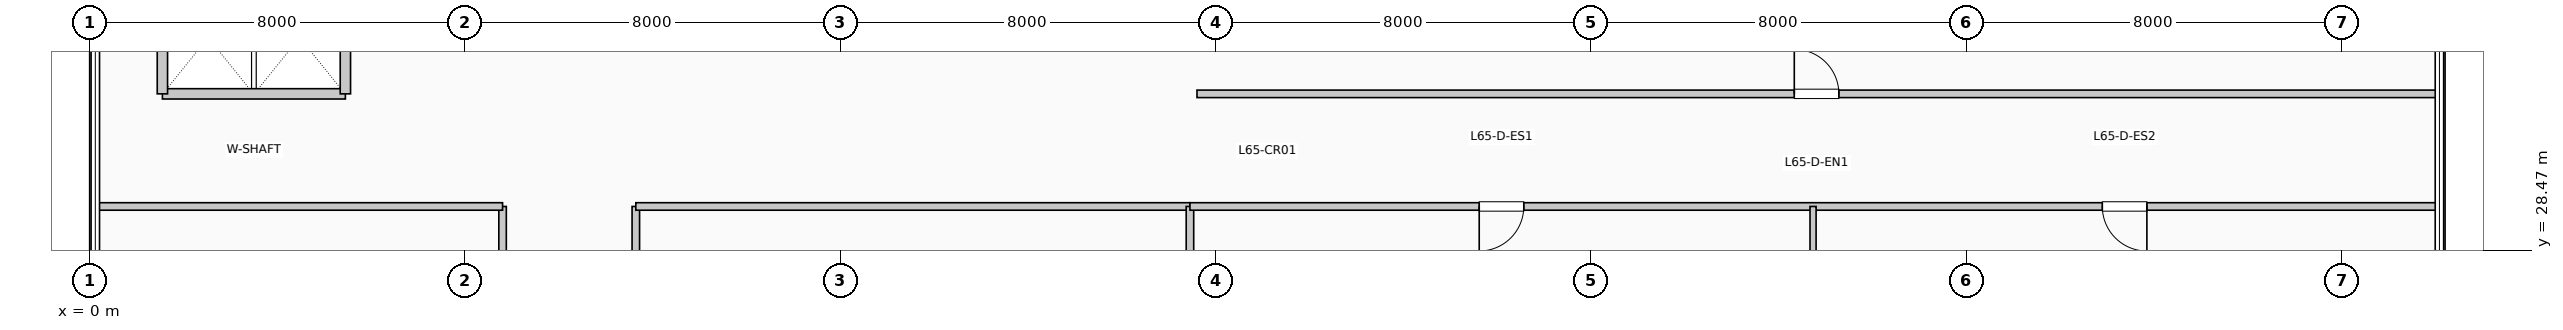
"""IFC4 building model, lengths in metres.
Left out: names, types, materials, properties, quantities, classifications, styles, units other than length and angle.
Written with IfcOpenShell. Run it as: python <this file> out.ifc"""

import sys

from ifc_helpers import new_model, si_unit, direction, frame, frame_2d, origin, place, context, subcontext, project, spatial, rectangle, extrude, element, fill, save


model = new_model("IFC4")
c1 = context("Model", 3, precision=1e-05, world=origin(), true_north=direction((0.0, 1.0)))
c2 = subcontext(c1, "Body", "Model", "MODEL_VIEW")
j1 = project(units=[si_unit("LENGTHUNIT", "METRE"), si_unit("PLANEANGLEUNIT", "RADIAN")], contexts=[c1])
p1 = place(None, origin())
s1 = spatial("IfcSite", under=j1, at=p1, CompositionType="ELEMENT")
p2 = place(p1, origin())
s2 = spatial("IfcBuilding", under=s1, at=p2, CompositionType="ELEMENT")
p3 = place(p2, frame((0.0, 0.0, 268.29)))
s3 = spatial("IfcBuildingStorey", under=s2, at=p3, CompositionType="ELEMENT", Elevation=268.29)
p4 = place(p3, frame((1.55, 31.8, 0.0), z_axis=(0.0, 0.0, 1.0), x_axis=(1.0, 0.0, 0.0)))
e1 = element("IfcWall", 1, at=p4, inside=s3, PredefinedType="PARTITIONING", context=c2, shape_type="SweptSolid", body=[
    extrude(rectangle(XDim=3.9, YDim=0.22, at=frame_2d((1.95, 0.0))), origin(), (0.0, 0.0, 1.0), 3.74),
])
for number, where, z_axis, x_axis in (
    (2, (1.55, 31.8, 0.0), (0.0, 0.0, 1.0), (0.0, 1.0, 0.0)),
    (3, (5.45, 31.8, 0.0), (0.0, 0.0, 1.0), (0.0, 1.0, 0.0)),
):
    element("IfcWall", number, at=place(p3, frame(where, z_axis=z_axis, x_axis=x_axis)), inside=s3, PredefinedType="PARTITIONING", context=c2, shape_type="SweptSolid", body=[
        extrude(rectangle(XDim=2.38, YDim=0.22, at=frame_2d((1.19, 0.0))), origin(), (0.0, 0.0, 1.0), 3.74),
    ])
p5 = place(p3, frame((8.8, 15.0, 0.0), z_axis=(0.0, 0.0, 1.0), x_axis=(0.0, 1.0, 0.0)))
e4 = element("IfcWall", 4, at=p5, inside=s3, PredefinedType="PARTITIONING", context=c2, shape_type="SweptSolid", body=[
    extrude(rectangle(XDim=14.4, YDim=0.16, at=frame_2d((7.2, 0.0))), origin(), (0.0, 0.0, 1.0), 3.74),
])
p6 = place(p5, frame((2.059, 0.0, 0.0), z_axis=(0.0, 0.0, 1.0), x_axis=(-1.0, 0.0, 0.0)))
e5 = element("IfcOpeningElement", 5, at=p6, cuts=e4, PredefinedType="OPENING", context=c2, shape_type="SweptSolid", body=[
    extrude(rectangle(XDim=0.95, YDim=2.15, at=frame_2d((0.475, 1.075))), frame((0.0, 0.09, 0.0), z_axis=(0.0, -1.0, 0.0), x_axis=(1.0, 0.0, 0.0)), (0.0, 0.0, 1.0), 0.18),
])
p7 = place(p5, frame((5.515, 0.0, 0.0), z_axis=(0.0, 0.0, 1.0), x_axis=(-1.0, 0.0, 0.0)))
e6 = element("IfcOpeningElement", 6, at=p7, cuts=e4, PredefinedType="OPENING", context=c2, shape_type="SweptSolid", body=[
    extrude(rectangle(XDim=0.95, YDim=2.15, at=frame_2d((0.475, 1.075))), frame((0.0, 0.09, 0.0), z_axis=(0.0, -1.0, 0.0), x_axis=(1.0, 0.0, 0.0)), (0.0, 0.0, 1.0), 0.18),
])
p8 = place(p5, frame((9.331, 0.0, 0.0), z_axis=(0.0, 0.0, 1.0), x_axis=(-1.0, 0.0, 0.0)))
e7 = element("IfcOpeningElement", 7, at=p8, cuts=e4, PredefinedType="OPENING", context=c2, shape_type="SweptSolid", body=[
    extrude(rectangle(XDim=0.95, YDim=2.15, at=frame_2d((0.475, 1.075))), frame((0.0, 0.09, 0.0), z_axis=(0.0, -1.0, 0.0), x_axis=(1.0, 0.0, 0.0)), (0.0, 0.0, 1.0), 0.18),
])
p9 = place(p5, frame((13.075, 0.0, 0.0), z_axis=(0.0, 0.0, 1.0), x_axis=(-1.0, 0.0, 0.0)))
e8 = element("IfcOpeningElement", 8, at=p9, cuts=e4, PredefinedType="OPENING", context=c2, shape_type="SweptSolid", body=[
    extrude(rectangle(XDim=0.95, YDim=2.15, at=frame_2d((0.475, 1.075))), frame((0.0, 0.09, 0.0), z_axis=(0.0, -1.0, 0.0), x_axis=(1.0, 0.0, 0.0)), (0.0, 0.0, 1.0), 0.18),
])
p10 = place(p3, frame((11.64, 15.0, 0.0), z_axis=(0.0, 0.0, 1.0), x_axis=(0.0, 1.0, 0.0)))
e9 = element("IfcWall", 9, at=p10, inside=s3, PredefinedType="PARTITIONING", context=c2, shape_type="SweptSolid", body=[
    extrude(rectangle(XDim=14.4, YDim=0.16, at=frame_2d((7.2, 0.0))), origin(), (0.0, 0.0, 1.0), 3.125),
])
p11 = place(p10, frame((2.125, 0.0, 0.0)))
e10 = element("IfcOpeningElement", 10, at=p11, cuts=e9, PredefinedType="OPENING", context=c2, shape_type="SweptSolid", body=[
    extrude(rectangle(XDim=0.95, YDim=2.15, at=frame_2d((0.475, 1.075))), frame((0.0, 0.09, 0.0), z_axis=(0.0, -1.0, 0.0), x_axis=(1.0, 0.0, 0.0)), (0.0, 0.0, 1.0), 0.18),
])
p12 = place(p10, frame((10.325, 0.0, 0.0)))
e11 = element("IfcOpeningElement", 11, at=p12, cuts=e9, PredefinedType="OPENING", context=c2, shape_type="SweptSolid", body=[
    extrude(rectangle(XDim=0.95, YDim=2.15, at=frame_2d((0.475, 1.075))), frame((0.0, 0.09, 0.0), z_axis=(0.0, -1.0, 0.0), x_axis=(1.0, 0.0, 0.0)), (0.0, 0.0, 1.0), 0.18),
])
p13 = place(p3, frame((0.19, 29.4, 0.0), z_axis=(0.0, 0.0, 1.0), x_axis=(1.0, 0.0, 0.0)))
e12 = element("IfcWall", 12, at=p13, inside=s3, PredefinedType="PARTITIONING", context=c2, shape_type="SweptSolid", body=[
    extrude(rectangle(XDim=8.61, YDim=0.16, at=frame_2d((4.305, 0.0))), origin(), (0.0, 0.0, 1.0), 3.395),
])
p14 = place(p3, frame((11.64, 29.4, 0.0), z_axis=(0.0, 0.0, 1.0), x_axis=(1.0, 0.0, 0.0)))
e13 = element("IfcWall", 13, at=p14, inside=s3, PredefinedType="PARTITIONING", context=c2, shape_type="SweptSolid", body=[
    extrude(rectangle(XDim=11.81, YDim=0.16, at=frame_2d((5.905, 0.0))), origin(), (0.0, 0.0, 1.0), 3.395),
])
p15 = place(p3, frame((23.45, 5.99, 0.0), z_axis=(0.0, 0.0, 1.0), x_axis=(0.0, 1.0, 0.0)))
e14 = element("IfcWall", 14, at=p15, inside=s3, PredefinedType="PARTITIONING", context=c2, shape_type="SweptSolid", body=[
    extrude(rectangle(XDim=23.41, YDim=0.16, at=frame_2d((11.705, 0.0))), origin(), (0.0, 0.0, 1.0), 3.125),
])
p16 = place(p3, frame((23.45, 29.4, 0.0), z_axis=(0.0, 0.0, 1.0), x_axis=(1.0, 0.0, 0.0)))
e15 = element("IfcWall", 15, at=p16, inside=s3, PredefinedType="PARTITIONING", context=c2, shape_type="SweptSolid", body=[
    extrude(rectangle(XDim=26.56, YDim=0.16, at=frame_2d((13.28, 0.0))), origin(), (0.0, 0.0, 1.0), 3.335),
])
p17 = place(p16, frame((7.115, 0.0, 0.0), z_axis=(0.0, 0.0, 1.0), x_axis=(-1.0, 0.0, 0.0)))
e16 = element("IfcOpeningElement", 16, at=p17, cuts=e15, PredefinedType="OPENING", context=c2, shape_type="SweptSolid", body=[
    extrude(rectangle(XDim=0.95, YDim=2.15, at=frame_2d((0.475, 1.075))), frame((0.0, 0.09, 0.0), z_axis=(0.0, -1.0, 0.0), x_axis=(1.0, 0.0, 0.0)), (0.0, 0.0, 1.0), 0.18),
])
p18 = place(p16, frame((20.395, 0.0, 0.0), z_axis=(0.0, 0.0, 1.0), x_axis=(-1.0, 0.0, 0.0)))
e17 = element("IfcOpeningElement", 17, at=p18, cuts=e15, PredefinedType="OPENING", context=c2, shape_type="SweptSolid", body=[
    extrude(rectangle(XDim=0.95, YDim=2.15, at=frame_2d((0.475, 1.075))), frame((0.0, 0.09, 0.0), z_axis=(0.0, -1.0, 0.0), x_axis=(1.0, 0.0, 0.0)), (0.0, 0.0, 1.0), 0.18),
])
p19 = place(p3, frame((23.6, 31.8, 0.0), z_axis=(0.0, 0.0, 1.0), x_axis=(1.0, 0.0, 0.0)))
e18 = element("IfcWall", 18, at=p19, inside=s3, PredefinedType="PARTITIONING", context=c2, shape_type="SweptSolid", body=[
    extrude(rectangle(XDim=26.41, YDim=0.16, at=frame_2d((13.205, 0.0))), origin(), (0.0, 0.0, 1.0), 3.74),
])
p20 = place(p19, frame((12.73, 0.0, 0.0)))
e19 = element("IfcOpeningElement", 19, at=p20, cuts=e18, PredefinedType="OPENING", context=c2, shape_type="SweptSolid", body=[
    extrude(rectangle(XDim=0.95, YDim=2.15, at=frame_2d((0.475, 1.075))), frame((0.0, 0.09, 0.0), z_axis=(0.0, -1.0, 0.0), x_axis=(1.0, 0.0, 0.0)), (0.0, 0.0, 1.0), 0.18),
])
p21 = place(p3, frame((36.73, 22.19, 0.0), z_axis=(0.0, 0.0, 1.0), x_axis=(0.0, 1.0, 0.0)))
e20 = element("IfcWall", 20, at=p21, inside=s3, PredefinedType="PARTITIONING", context=c2, shape_type="SweptSolid", body=[
    extrude(rectangle(XDim=7.21, YDim=0.13, at=frame_2d((3.605, 0.0))), origin(), (0.0, 0.0, 1.0), 3.74),
])
p22 = place(p17, origin())
e21 = element("IfcDoor", 21, at=p22, inside=s3, OperationType="SINGLE_SWING_LEFT", PredefinedType="DOOR", context=c2, shape_type="SweptSolid", body=[
    extrude(rectangle(XDim=0.95, YDim=2.15, at=frame_2d((0.475, 1.075))), frame((0.0, 0.025, 0.0), z_axis=(0.0, -1.0, 0.0), x_axis=(1.0, 0.0, 0.0)), (0.0, 0.0, 1.0), 0.05),
])
fill(e16, e21)
p23 = place(p18, origin())
e22 = element("IfcDoor", 22, at=p23, inside=s3, OperationType="SINGLE_SWING_RIGHT", PredefinedType="DOOR", context=c2, shape_type="SweptSolid", body=[
    extrude(rectangle(XDim=0.95, YDim=2.15, at=frame_2d((0.475, 1.075))), frame((0.0, 0.025, 0.0), z_axis=(0.0, -1.0, 0.0), x_axis=(1.0, 0.0, 0.0)), (0.0, 0.0, 1.0), 0.05),
])
fill(e17, e22)
p24 = place(p20, origin())
e23 = element("IfcDoor", 23, at=p24, inside=s3, OperationType="SINGLE_SWING_LEFT", PredefinedType="DOOR", context=c2, shape_type="SweptSolid", body=[
    extrude(rectangle(XDim=0.95, YDim=2.15, at=frame_2d((0.475, 1.075))), frame((0.0, 0.025, 0.0), z_axis=(0.0, -1.0, 0.0), x_axis=(1.0, 0.0, 0.0)), (0.0, 0.0, 1.0), 0.05),
])
fill(e19, e23)
save(model, sys.argv[1])
